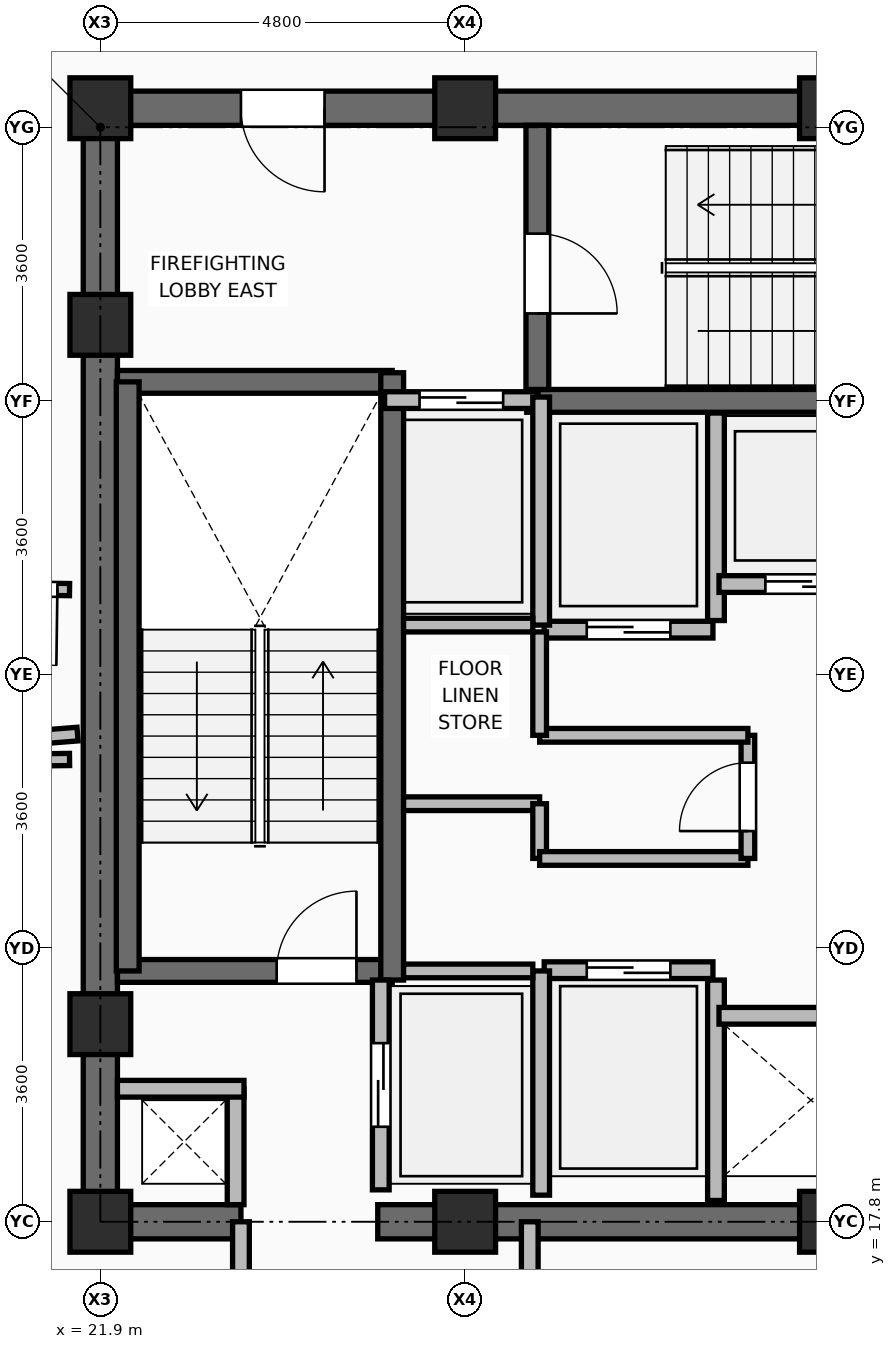
"""IFC4 building model, lengths in metres.
Left out: names, types, materials, properties, quantities, classifications, styles, units other than length and angle.
Written with IfcOpenShell. Run it as: python <this file> out.ifc"""

import sys

from ifc_helpers import new_model, si_unit, direction, frame, frame_2d, origin, origin_2d, place, context, subcontext, project, spatial, rectangle, extrude, element, fill, save


model = new_model("IFC4")
c1 = context("Model", 3, precision=1e-05, world=origin(), true_north=direction((0.0, 1.0)))
c2 = subcontext(c1, "Body", "Model", "MODEL_VIEW")
j1 = project(units=[si_unit("LENGTHUNIT", "METRE"), si_unit("PLANEANGLEUNIT", "RADIAN")], contexts=[c1])
p1 = place(None, origin())
s1 = spatial("IfcSite", under=j1, at=p1, CompositionType="ELEMENT")
p2 = place(p1, origin())
s2 = spatial("IfcBuilding", under=s1, at=p2, CompositionType="ELEMENT")
p3 = place(p2, frame((0.0, 0.0, 212.4)))
s3 = spatial("IfcBuildingStorey", under=s2, at=p3, CompositionType="ELEMENT", Elevation=212.4)
for number, where, z_axis, x_axis in (
    (1, (21.9, 17.8, 0.0), (0.0, 0.0, 1.0), (1.0, 0.0, 0.0)),
    (2, (26.7, 17.8, 0.0), (0.0, 0.0, 1.0), (1.0, 0.0, 0.0)),
    (3, (31.5, 17.8, 0.0), (0.0, 0.0, 1.0), (1.0, 0.0, 0.0)),
    (4, (21.9, 20.4, 0.0), (0.0, 0.0, 1.0), (1.0, 0.0, 0.0)),
    (5, (21.9, 29.6, 0.0), (0.0, 0.0, 1.0), (1.0, 0.0, 0.0)),
    (6, (21.9, 32.45, 0.0), (0.0, 0.0, 1.0), (1.0, 0.0, 0.0)),
    (7, (26.7, 32.45, 0.0), (0.0, 0.0, 1.0), (1.0, 0.0, 0.0)),
    (8, (31.5, 32.45, 0.0), (0.0, 0.0, 1.0), (1.0, 0.0, 0.0)),
):
    element("IfcColumn", number, at=place(p3, frame(where, z_axis=z_axis, x_axis=x_axis)), inside=s3, PredefinedType="COLUMN", context=c2, shape_type="SweptSolid", body=[
        extrude(rectangle(XDim=0.8, YDim=0.8, at=origin_2d()), origin(), (0.0, 0.0, 1.0), 3.75),
    ])
p4 = place(p3, frame((30.0, 18.08, 0.0), z_axis=(0.0, 0.0, 1.0), x_axis=(0.0, 1.0, 0.0)))
e9 = element("IfcWall", 9, at=p4, inside=s3, PredefinedType="PARTITIONING", context=c2, shape_type="SweptSolid", body=[
    extrude(rectangle(XDim=2.9, YDim=0.22, at=frame_2d((1.45, 0.0))), origin(), (0.0, 0.0, 1.0), 3.545),
])
p5 = place(p3, frame((30.0, 25.71, 0.0), z_axis=(0.0, 0.0, 1.0), x_axis=(0.0, 1.0, 0.0)))
e10 = element("IfcWall", 10, at=p5, inside=s3, PredefinedType="PARTITIONING", context=c2, shape_type="SweptSolid", body=[
    extrude(rectangle(XDim=2.73, YDim=0.22, at=frame_2d((1.365, 0.0))), origin(), (0.0, 0.0, 1.0), 3.545),
])
p6 = place(p3, frame((21.675, 17.8, 0.0), z_axis=(0.0, 0.0, 1.0), x_axis=(1.0, 0.0, 0.0)))
e11 = element("IfcWall", 11, at=p6, inside=s3, PredefinedType="SHEAR", context=c2, shape_type="SweptSolid", body=[
    extrude(rectangle(XDim=2.075, YDim=0.45, at=frame_2d((1.038, 0.0))), origin(), (0.0, 0.0, 1.0), 3.57),
])
p7 = place(p3, frame((25.55, 17.8, 0.0), z_axis=(0.0, 0.0, 1.0), x_axis=(1.0, 0.0, 0.0)))
e12 = element("IfcWall", 12, at=p7, inside=s3, PredefinedType="SHEAR", context=c2, shape_type="SweptSolid", body=[
    extrude(rectangle(XDim=6.9, YDim=0.45, at=frame_2d((3.45, 0.0))), origin(), (0.0, 0.0, 1.0), 3.57),
])
p8 = place(p3, frame((21.675, 32.45, 0.0), z_axis=(0.0, 0.0, 1.0), x_axis=(1.0, 0.0, 0.0)))
e13 = element("IfcWall", 13, at=p8, inside=s3, PredefinedType="SHEAR", context=c2, shape_type="SweptSolid", body=[
    extrude(rectangle(XDim=19.65, YDim=0.45, at=frame_2d((9.825, 0.0))), origin(), (0.0, 0.0, 1.0), 3.57),
])
p9 = place(p8, frame((2.075, 0.0, 0.0)))
e14 = element("IfcOpeningElement", 14, at=p9, cuts=e13, PredefinedType="OPENING", context=c2, shape_type="SweptSolid", body=[
    extrude(rectangle(XDim=1.1, YDim=2.1, at=frame_2d((0.55, 1.05))), frame((0.0, 0.235, 0.0), z_axis=(0.0, -1.0, 0.0), x_axis=(1.0, 0.0, 0.0)), (0.0, 0.0, 1.0), 0.47),
])
p10 = place(p8, frame((15.465, 0.0, 0.0)))
e15 = element("IfcOpeningElement", 15, at=p10, cuts=e13, PredefinedType="OPENING", context=c2, shape_type="SweptSolid", body=[
    extrude(rectangle(XDim=1.0, YDim=2.1, at=frame_2d((0.5, 1.05))), frame((0.0, 0.235, 0.0), z_axis=(0.0, -1.0, 0.0), x_axis=(1.0, 0.0, 0.0)), (0.0, 0.0, 1.0), 0.47),
])
p11 = place(p8, frame((17.475, 0.0, 0.0)))
e16 = element("IfcOpeningElement", 16, at=p11, cuts=e13, PredefinedType="OPENING", context=c2, shape_type="SweptSolid", body=[
    extrude(rectangle(XDim=0.9, YDim=2.1, at=frame_2d((0.45, 1.05))), frame((0.0, 0.235, 0.0), z_axis=(0.0, -1.0, 0.0), x_axis=(1.0, 0.0, 0.0)), (0.0, 0.0, 1.0), 0.47),
])
p12 = place(p3, frame((21.9, 18.025, 0.0), z_axis=(0.0, 0.0, 1.0), x_axis=(0.0, 1.0, 0.0)))
e17 = element("IfcWall", 17, at=p12, inside=s3, PredefinedType="SHEAR", context=c2, shape_type="SweptSolid", body=[
    extrude(rectangle(XDim=14.2, YDim=0.45, at=frame_2d((7.1, 0.0))), origin(), (0.0, 0.0, 1.0), 3.57),
])
p13 = place(p3, frame((22.125, 21.1, 0.0), z_axis=(0.0, 0.0, 1.0), x_axis=(1.0, 0.0, 0.0)))
e18 = element("IfcWall", 18, at=p13, inside=s3, PredefinedType="SHEAR", context=c2, shape_type="SweptSolid", body=[
    extrude(rectangle(XDim=3.615, YDim=0.3, at=frame_2d((1.808, 0.0))), origin(), (0.0, 0.0, 1.0), 3.57),
])
p14 = place(p13, frame((2.095, 0.0, 0.0)))
e19 = element("IfcOpeningElement", 19, at=p14, cuts=e18, PredefinedType="OPENING", context=c2, shape_type="SweptSolid", body=[
    extrude(rectangle(XDim=1.05, YDim=2.1, at=frame_2d((0.525, 1.05))), frame((0.0, 0.16, 0.0), z_axis=(0.0, -1.0, 0.0), x_axis=(1.0, 0.0, 0.0)), (0.0, 0.0, 1.0), 0.32),
])
p15 = place(p3, frame((22.125, 28.85, 0.0), z_axis=(0.0, 0.0, 1.0), x_axis=(1.0, 0.0, 0.0)))
e20 = element("IfcWall", 20, at=p15, inside=s3, PredefinedType="SHEAR", context=c2, shape_type="SweptSolid", body=[
    extrude(rectangle(XDim=3.615, YDim=0.3, at=frame_2d((1.808, 0.0))), origin(), (0.0, 0.0, 1.0), 3.57),
])
p16 = place(p3, frame((25.74, 20.98, 0.0), z_axis=(0.0, 0.0, 1.0), x_axis=(0.0, 1.0, 0.0)))
e21 = element("IfcWall", 21, at=p16, inside=s3, PredefinedType="SHEAR", context=c2, shape_type="SweptSolid", body=[
    extrude(rectangle(XDim=7.99, YDim=0.3, at=frame_2d((3.995, 0.0))), origin(), (0.0, 0.0, 1.0), 3.57),
])
p17 = place(p3, frame((22.26, 21.1, 0.0), z_axis=(0.0, 0.0, 1.0), x_axis=(0.0, 1.0, 0.0)))
e22 = element("IfcWall", 22, at=p17, inside=s3, PredefinedType="SHEAR", context=c2, shape_type="SweptSolid", body=[
    extrude(rectangle(XDim=7.75, YDim=0.3, at=frame_2d((3.875, 0.0))), origin(), (0.0, 0.0, 1.0), 3.57),
])
p18 = place(p3, frame((27.51, 28.6, 0.0), z_axis=(0.0, 0.0, 1.0), x_axis=(1.0, 0.0, 0.0)))
e23 = element("IfcWall", 23, at=p18, inside=s3, PredefinedType="SHEAR", context=c2, shape_type="SweptSolid", body=[
    extrude(rectangle(XDim=8.03, YDim=0.3, at=frame_2d((4.015, 0.0))), origin(), (0.0, 0.0, 1.0), 3.57),
])
p19 = place(p3, frame((27.65, 28.75, 0.0), z_axis=(0.0, 0.0, 1.0), x_axis=(0.0, 1.0, 0.0)))
e24 = element("IfcWall", 24, at=p19, inside=s3, PredefinedType="SHEAR", context=c2, shape_type="SweptSolid", body=[
    extrude(rectangle(XDim=3.475, YDim=0.3, at=frame_2d((1.738, 0.0))), origin(), (0.0, 0.0, 1.0), 3.57),
])
p20 = place(p19, frame((1.0, 0.0, 0.0)))
e25 = element("IfcOpeningElement", 25, at=p20, cuts=e24, PredefinedType="OPENING", context=c2, shape_type="SweptSolid", body=[
    extrude(rectangle(XDim=1.05, YDim=2.1, at=frame_2d((0.525, 1.05))), frame((0.0, 0.16, 0.0), z_axis=(0.0, -1.0, 0.0), x_axis=(1.0, 0.0, 0.0)), (0.0, 0.0, 1.0), 0.32),
])
p21 = place(p3, frame((23.68, 18.025, 0.0), z_axis=(0.0, 0.0, 1.0), x_axis=(0.0, 1.0, 0.0)))
e26 = element("IfcWall", 26, at=p21, inside=s3, PredefinedType="PARTITIONING", context=c2, shape_type="SweptSolid", body=[
    extrude(rectangle(XDim=1.525, YDim=0.22, at=frame_2d((0.763, 0.0))), origin(), (0.0, 0.0, 1.0), 3.55),
])
p22 = place(p3, frame((22.125, 19.55, 0.0), z_axis=(0.0, 0.0, 1.0), x_axis=(1.0, 0.0, 0.0)))
e27 = element("IfcWall", 27, at=p22, inside=s3, PredefinedType="PARTITIONING", context=c2, shape_type="SweptSolid", body=[
    extrude(rectangle(XDim=1.665, YDim=0.22, at=frame_2d((0.833, 0.0))), origin(), (0.0, 0.0, 1.0), 2.595),
])
p23 = place(p3, frame((25.59, 18.22, 0.0), z_axis=(0.0, 0.0, 1.0), x_axis=(0.0, 1.0, 0.0)))
e28 = element("IfcWall", 28, at=p23, inside=s3, PredefinedType="PARTITIONING", context=c2, shape_type="SweptSolid", body=[
    extrude(rectangle(XDim=2.76, YDim=0.22, at=frame_2d((1.38, 0.0))), origin(), (0.0, 0.0, 1.0), 3.55),
])
p24 = place(p23, frame((0.83, 0.0, 0.0)))
e29 = element("IfcOpeningElement", 29, at=p24, cuts=e28, PredefinedType="OPENING", context=c2, shape_type="SweptSolid", body=[
    extrude(rectangle(XDim=1.1, YDim=2.2, at=frame_2d((0.55, 1.1))), frame((0.0, 0.12, 0.0), z_axis=(0.0, -1.0, 0.0), x_axis=(1.0, 0.0, 0.0)), (0.0, 0.0, 1.0), 0.24),
])
p25 = place(p3, frame((25.64, 28.61, 0.0), z_axis=(0.0, 0.0, 1.0), x_axis=(1.0, 0.0, 0.0)))
e30 = element("IfcWall", 30, at=p25, inside=s3, PredefinedType="PARTITIONING", context=c2, shape_type="SweptSolid", body=[
    extrude(rectangle(XDim=2.02, YDim=0.22, at=frame_2d((1.01, 0.0))), origin(), (0.0, 0.0, 1.0), 3.55),
])
p26 = place(p25, frame((0.46, 0.0, 0.0)))
e31 = element("IfcOpeningElement", 31, at=p26, cuts=e30, PredefinedType="OPENING", context=c2, shape_type="SweptSolid", body=[
    extrude(rectangle(XDim=1.1, YDim=2.2, at=frame_2d((0.55, 1.1))), frame((0.0, 0.12, 0.0), z_axis=(0.0, -1.0, 0.0), x_axis=(1.0, 0.0, 0.0)), (0.0, 0.0, 1.0), 0.24),
])
p27 = place(p3, frame((27.74, 21.11, 0.0), z_axis=(0.0, 0.0, 1.0), x_axis=(1.0, 0.0, 0.0)))
e32 = element("IfcWall", 32, at=p27, inside=s3, PredefinedType="PARTITIONING", context=c2, shape_type="SweptSolid", body=[
    extrude(rectangle(XDim=2.22, YDim=0.22, at=frame_2d((1.11, 0.0))), origin(), (0.0, 0.0, 1.0), 3.55),
])
p28 = place(p27, frame((0.56, 0.0, 0.0)))
e33 = element("IfcOpeningElement", 33, at=p28, cuts=e32, PredefinedType="OPENING", context=c2, shape_type="SweptSolid", body=[
    extrude(rectangle(XDim=1.1, YDim=2.2, at=frame_2d((0.55, 1.1))), frame((0.0, 0.12, 0.0), z_axis=(0.0, -1.0, 0.0), x_axis=(1.0, 0.0, 0.0)), (0.0, 0.0, 1.0), 0.24),
])
p29 = place(p3, frame((27.74, 25.59, 0.0), z_axis=(0.0, 0.0, 1.0), x_axis=(1.0, 0.0, 0.0)))
e34 = element("IfcWall", 34, at=p29, inside=s3, PredefinedType="PARTITIONING", context=c2, shape_type="SweptSolid", body=[
    extrude(rectangle(XDim=2.22, YDim=0.22, at=frame_2d((1.11, 0.0))), origin(), (0.0, 0.0, 1.0), 3.55),
])
p30 = place(p29, frame((0.56, 0.0, 0.0)))
e35 = element("IfcOpeningElement", 35, at=p30, cuts=e34, PredefinedType="OPENING", context=c2, shape_type="SweptSolid", body=[
    extrude(rectangle(XDim=1.1, YDim=2.2, at=frame_2d((0.55, 1.1))), frame((0.0, 0.12, 0.0), z_axis=(0.0, -1.0, 0.0), x_axis=(1.0, 0.0, 0.0)), (0.0, 0.0, 1.0), 0.24),
])
p31 = place(p3, frame((30.04, 20.51, 0.0), z_axis=(0.0, 0.0, 1.0), x_axis=(1.0, 0.0, 0.0)))
e36 = element("IfcWall", 36, at=p31, inside=s3, PredefinedType="PARTITIONING", context=c2, shape_type="SweptSolid", body=[
    extrude(rectangle(XDim=2.42, YDim=0.22, at=frame_2d((1.21, 0.0))), origin(), (0.0, 0.0, 1.0), 3.55),
])
p32 = place(p3, frame((30.04, 26.19, 0.0), z_axis=(0.0, 0.0, 1.0), x_axis=(1.0, 0.0, 0.0)))
e37 = element("IfcWall", 37, at=p32, inside=s3, PredefinedType="PARTITIONING", context=c2, shape_type="SweptSolid", body=[
    extrude(rectangle(XDim=2.32, YDim=0.22, at=frame_2d((1.16, 0.0))), origin(), (0.0, 0.0, 1.0), 3.55),
])
p33 = place(p32, frame((0.61, 0.0, 0.0)))
e38 = element("IfcOpeningElement", 38, at=p33, cuts=e37, PredefinedType="OPENING", context=c2, shape_type="SweptSolid", body=[
    extrude(rectangle(XDim=1.1, YDim=2.2, at=frame_2d((0.55, 1.1))), frame((0.0, 0.12, 0.0), z_axis=(0.0, -1.0, 0.0), x_axis=(1.0, 0.0, 0.0)), (0.0, 0.0, 1.0), 0.24),
])
p34 = place(p3, frame((27.7, 18.15, 0.0), z_axis=(0.0, 0.0, 1.0), x_axis=(0.0, 1.0, 0.0)))
e39 = element("IfcWall", 39, at=p34, inside=s3, PredefinedType="PARTITIONING", context=c2, shape_type="SweptSolid", body=[
    extrude(rectangle(XDim=2.95, YDim=0.22, at=frame_2d((1.475, 0.0))), origin(), (0.0, 0.0, 1.0), 3.55),
])
p35 = place(p3, frame((27.7, 25.65, 0.0), z_axis=(0.0, 0.0, 1.0), x_axis=(0.0, 1.0, 0.0)))
e40 = element("IfcWall", 40, at=p35, inside=s3, PredefinedType="PARTITIONING", context=c2, shape_type="SweptSolid", body=[
    extrude(rectangle(XDim=3.0, YDim=0.22, at=frame_2d((1.5, 0.0))), origin(), (0.0, 0.0, 1.0), 3.55),
])
for number, where, z_axis, x_axis in (
    (41, (25.89, 21.1, 0.0), (0.0, 0.0, 1.0), (1.0, 0.0, 0.0)),
    (42, (25.89, 25.65, 0.0), (0.0, 0.0, 1.0), (1.0, 0.0, 0.0)),
):
    element("IfcWall", number, at=place(p3, frame(where, z_axis=z_axis, x_axis=x_axis)), inside=s3, PredefinedType="PARTITIONING", context=c2, shape_type="SweptSolid", body=[
        extrude(rectangle(XDim=1.7, YDim=0.18, at=frame_2d((0.85, 0.0))), origin(), (0.0, 0.0, 1.0), 3.55),
    ])
p36 = place(p3, frame((25.89, 23.3, 0.0), z_axis=(0.0, 0.0, 1.0), x_axis=(1.0, 0.0, 0.0)))
e43 = element("IfcWall", 43, at=p36, inside=s3, PredefinedType="PARTITIONING", context=c2, shape_type="SweptSolid", body=[
    extrude(rectangle(XDim=1.79, YDim=0.18, at=frame_2d((0.895, 0.0))), origin(), (0.0, 0.0, 1.0), 3.55),
])
p37 = place(p3, frame((27.68, 22.58, 0.0), z_axis=(0.0, 0.0, 1.0), x_axis=(0.0, 1.0, 0.0)))
e44 = element("IfcWall", 44, at=p37, inside=s3, PredefinedType="PARTITIONING", context=c2, shape_type="SweptSolid", body=[
    extrude(rectangle(XDim=0.72, YDim=0.18, at=frame_2d((0.36, 0.0))), origin(), (0.0, 0.0, 1.0), 3.55),
])
p38 = place(p3, frame((27.68, 22.58, 0.0), z_axis=(0.0, 0.0, 1.0), x_axis=(1.0, 0.0, 0.0)))
e45 = element("IfcWall", 45, at=p38, inside=s3, PredefinedType="PARTITIONING", context=c2, shape_type="SweptSolid", body=[
    extrude(rectangle(XDim=2.74, YDim=0.18, at=frame_2d((1.37, 0.0))), origin(), (0.0, 0.0, 1.0), 3.55),
])
p39 = place(p3, frame((30.42, 22.58, 0.0), z_axis=(0.0, 0.0, 1.0), x_axis=(0.0, 1.0, 0.0)))
e46 = element("IfcWall", 46, at=p39, inside=s3, PredefinedType="PARTITIONING", context=c2, shape_type="SweptSolid", body=[
    extrude(rectangle(XDim=1.62, YDim=0.18, at=frame_2d((0.81, 0.0))), origin(), (0.0, 0.0, 1.0), 3.55),
])
p40 = place(p39, frame((0.36, 0.0, 0.0)))
e47 = element("IfcOpeningElement", 47, at=p40, cuts=e46, PredefinedType="OPENING", context=c2, shape_type="SweptSolid", body=[
    extrude(rectangle(XDim=0.9, YDim=2.1, at=frame_2d((0.45, 1.05))), frame((0.0, 0.1, 0.0), z_axis=(0.0, -1.0, 0.0), x_axis=(1.0, 0.0, 0.0)), (0.0, 0.0, 1.0), 0.2),
])
p41 = place(p3, frame((27.68, 24.2, 0.0), z_axis=(0.0, 0.0, 1.0), x_axis=(1.0, 0.0, 0.0)))
e48 = element("IfcWall", 48, at=p41, inside=s3, PredefinedType="PARTITIONING", context=c2, shape_type="SweptSolid", body=[
    extrude(rectangle(XDim=2.74, YDim=0.18, at=frame_2d((1.37, 0.0))), origin(), (0.0, 0.0, 1.0), 3.55),
])
p42 = place(p3, frame((27.68, 24.2, 0.0), z_axis=(0.0, 0.0, 1.0), x_axis=(0.0, 1.0, 0.0)))
e49 = element("IfcWall", 49, at=p42, inside=s3, PredefinedType="PARTITIONING", context=c2, shape_type="SweptSolid", body=[
    extrude(rectangle(XDim=1.36, YDim=0.18, at=frame_2d((0.68, 0.0))), origin(), (0.0, 0.0, 1.0), 3.55),
])
p43 = place(p3, frame((23.75, 14.35, 0.0), z_axis=(0.0, 0.0, 1.0), x_axis=(0.0, 1.0, 0.0)))
e50 = element("IfcWall", 50, at=p43, inside=s3, PredefinedType="PARTITIONING", context=c2, shape_type="SweptSolid", body=[
    extrude(rectangle(XDim=3.45, YDim=0.22, at=frame_2d((1.725, 0.0))), origin(), (0.0, 0.0, 1.0), 3.081),
])
p44 = place(p3, frame((27.55, 14.35, 0.0), z_axis=(0.0, 0.0, 1.0), x_axis=(0.0, 1.0, 0.0)))
e51 = element("IfcWall", 51, at=p44, inside=s3, PredefinedType="PARTITIONING", context=c2, shape_type="SweptSolid", body=[
    extrude(rectangle(XDim=3.45, YDim=0.22, at=frame_2d((1.725, 0.0))), origin(), (0.0, 0.0, 1.0), 3.081),
])
p45 = place(p44, frame((1.175, 0.0, 0.0)))
e52 = element("IfcOpeningElement", 52, at=p45, cuts=e51, PredefinedType="OPENING", context=c2, shape_type="SweptSolid", body=[
    extrude(rectangle(XDim=1.1, YDim=2.1, at=frame_2d((0.55, 1.05))), frame((0.0, 0.12, 0.0), z_axis=(0.0, -1.0, 0.0), x_axis=(1.0, 0.0, 0.0)), (0.0, 0.0, 1.0), 0.24),
])
p46 = place(p3, frame((21.495, 26.117, 0.0), z_axis=(0.0, 0.0, 1.0), x_axis=(-0.999908537082, 0.013524698532, 0.0)))
e53 = element("IfcWall", 53, at=p46, inside=s3, PredefinedType="PARTITIONING", context=c2, shape_type="SweptSolid", body=[
    extrude(rectangle(XDim=1.859, YDim=0.16, at=frame_2d((0.93, 0.0))), origin(), (0.0, 0.0, 1.0), 2.595),
])
p47 = place(p46, frame((0.16, 0.0, 0.0)))
e54 = element("IfcOpeningElement", 54, at=p47, cuts=e53, PredefinedType="OPENING", context=c2, shape_type="SweptSolid", body=[
    extrude(rectangle(XDim=1.0, YDim=2.1, at=frame_2d((0.5, 1.05))), frame((0.0, 0.09, 0.0), z_axis=(0.0, -1.0, 0.0), x_axis=(1.0, 0.0, 0.0)), (0.0, 0.0, 1.0), 0.18),
])
p48 = place(p3, frame((19.636, 23.858, 0.0), z_axis=(0.0, 0.0, 1.0), x_axis=(0.999915502175, 0.012999558072, 0.0)))
e55 = element("IfcWall", 55, at=p48, inside=s3, PredefinedType="PARTITIONING", context=c2, shape_type="SweptSolid", body=[
    extrude(rectangle(XDim=1.859, YDim=0.16, at=frame_2d((0.93, 0.0))), origin(), (0.0, 0.0, 1.0), 2.595),
])
p49 = place(p3, frame((21.6, 24.216, 0.0), z_axis=(0.0, 0.0, 1.0), x_axis=(-0.996876465471, -0.078976658517, 0.0)))
e56 = element("IfcWall", 56, at=p49, inside=s3, PredefinedType="PARTITIONING", context=c2, shape_type="SweptSolid", body=[
    extrude(rectangle(XDim=12.575, YDim=0.18, at=frame_2d((6.288, 0.0))), origin(), (0.0, 0.0, 1.0), 2.595),
])
p50 = place(p14, origin())
e57 = element("IfcDoor", 57, at=p50, inside=s3, OperationType="SINGLE_SWING_RIGHT", PredefinedType="DOOR", context=c2, shape_type="SweptSolid", body=[
    extrude(rectangle(XDim=1.05, YDim=2.1, at=frame_2d((0.525, 1.05))), frame((0.0, 0.025, 0.0), z_axis=(0.0, -1.0, 0.0), x_axis=(1.0, 0.0, 0.0)), (0.0, 0.0, 1.0), 0.05),
])
fill(e19, e57)
p51 = place(p20, frame((1.05, 0.0, 0.0), z_axis=(0.0, 0.0, 1.0), x_axis=(-1.0, 0.0, 0.0)))
e58 = element("IfcDoor", 58, at=p51, inside=s3, OperationType="SINGLE_SWING_RIGHT", PredefinedType="DOOR", context=c2, shape_type="SweptSolid", body=[
    extrude(rectangle(XDim=1.05, YDim=2.1, at=frame_2d((0.525, 1.05))), frame((0.0, 0.025, 0.0), z_axis=(0.0, -1.0, 0.0), x_axis=(1.0, 0.0, 0.0)), (0.0, 0.0, 1.0), 0.05),
])
fill(e25, e58)
p52 = place(p24, origin())
e59 = element("IfcDoor", 59, at=p52, inside=s3, OperationType="DOUBLE_DOOR_SLIDING", PredefinedType="DOOR", context=c2, shape_type="SweptSolid", body=[
    extrude(rectangle(XDim=1.1, YDim=2.2, at=frame_2d((0.55, 1.1))), frame((0.0, 0.025, 0.0), z_axis=(0.0, -1.0, 0.0), x_axis=(1.0, 0.0, 0.0)), (0.0, 0.0, 1.0), 0.05),
])
fill(e29, e59)
p53 = place(p26, origin())
e60 = element("IfcDoor", 60, at=p53, inside=s3, OperationType="DOUBLE_DOOR_SLIDING", PredefinedType="DOOR", context=c2, shape_type="SweptSolid", body=[
    extrude(rectangle(XDim=1.1, YDim=2.2, at=frame_2d((0.55, 1.1))), frame((0.0, 0.025, 0.0), z_axis=(0.0, -1.0, 0.0), x_axis=(1.0, 0.0, 0.0)), (0.0, 0.0, 1.0), 0.05),
])
fill(e31, e60)
p54 = place(p28, origin())
e61 = element("IfcDoor", 61, at=p54, inside=s3, OperationType="DOUBLE_DOOR_SLIDING", PredefinedType="DOOR", context=c2, shape_type="SweptSolid", body=[
    extrude(rectangle(XDim=1.1, YDim=2.2, at=frame_2d((0.55, 1.1))), frame((0.0, 0.025, 0.0), z_axis=(0.0, -1.0, 0.0), x_axis=(1.0, 0.0, 0.0)), (0.0, 0.0, 1.0), 0.05),
])
fill(e33, e61)
p55 = place(p30, frame((1.1, 0.0, 0.0), z_axis=(0.0, 0.0, 1.0), x_axis=(-1.0, 0.0, 0.0)))
e62 = element("IfcDoor", 62, at=p55, inside=s3, OperationType="DOUBLE_DOOR_SLIDING", PredefinedType="DOOR", context=c2, shape_type="SweptSolid", body=[
    extrude(rectangle(XDim=1.1, YDim=2.2, at=frame_2d((0.55, 1.1))), frame((0.0, 0.025, 0.0), z_axis=(0.0, -1.0, 0.0), x_axis=(1.0, 0.0, 0.0)), (0.0, 0.0, 1.0), 0.05),
])
fill(e35, e62)
p56 = place(p33, frame((1.1, 0.0, 0.0), z_axis=(0.0, 0.0, 1.0), x_axis=(-1.0, 0.0, 0.0)))
e63 = element("IfcDoor", 63, at=p56, inside=s3, OperationType="DOUBLE_DOOR_SLIDING", PredefinedType="DOOR", context=c2, shape_type="SweptSolid", body=[
    extrude(rectangle(XDim=1.1, YDim=2.2, at=frame_2d((0.55, 1.1))), frame((0.0, 0.025, 0.0), z_axis=(0.0, -1.0, 0.0), x_axis=(1.0, 0.0, 0.0)), (0.0, 0.0, 1.0), 0.05),
])
fill(e38, e63)
p57 = place(p40, origin())
e64 = element("IfcDoor", 64, at=p57, inside=s3, OperationType="SINGLE_SWING_LEFT", PredefinedType="DOOR", context=c2, shape_type="SweptSolid", body=[
    extrude(rectangle(XDim=0.9, YDim=2.1, at=frame_2d((0.45, 1.05))), frame((0.0, 0.025, 0.0), z_axis=(0.0, -1.0, 0.0), x_axis=(1.0, 0.0, 0.0)), (0.0, 0.0, 1.0), 0.05),
])
fill(e47, e64)
p58 = place(p9, frame((1.1, 0.0, 0.0), z_axis=(0.0, 0.0, 1.0), x_axis=(-1.0, 0.0, 0.0)))
e65 = element("IfcDoor", 65, at=p58, inside=s3, OperationType="SINGLE_SWING_LEFT", PredefinedType="DOOR", context=c2, shape_type="SweptSolid", body=[
    extrude(rectangle(XDim=1.1, YDim=2.1, at=frame_2d((0.55, 1.05))), frame((0.0, 0.025, 0.0), z_axis=(0.0, -1.0, 0.0), x_axis=(1.0, 0.0, 0.0)), (0.0, 0.0, 1.0), 0.05),
])
fill(e14, e65)
p59 = place(p47, origin())
e66 = element("IfcDoor", 66, at=p59, inside=s3, OperationType="SINGLE_SWING_LEFT", PredefinedType="DOOR", context=c2, shape_type="SweptSolid", body=[
    extrude(rectangle(XDim=1.0, YDim=2.1, at=frame_2d((0.5, 1.05))), frame((0.0, 0.025, 0.0), z_axis=(0.0, -1.0, 0.0), x_axis=(1.0, 0.0, 0.0)), (0.0, 0.0, 1.0), 0.05),
])
fill(e54, e66)
save(model, sys.argv[1])
